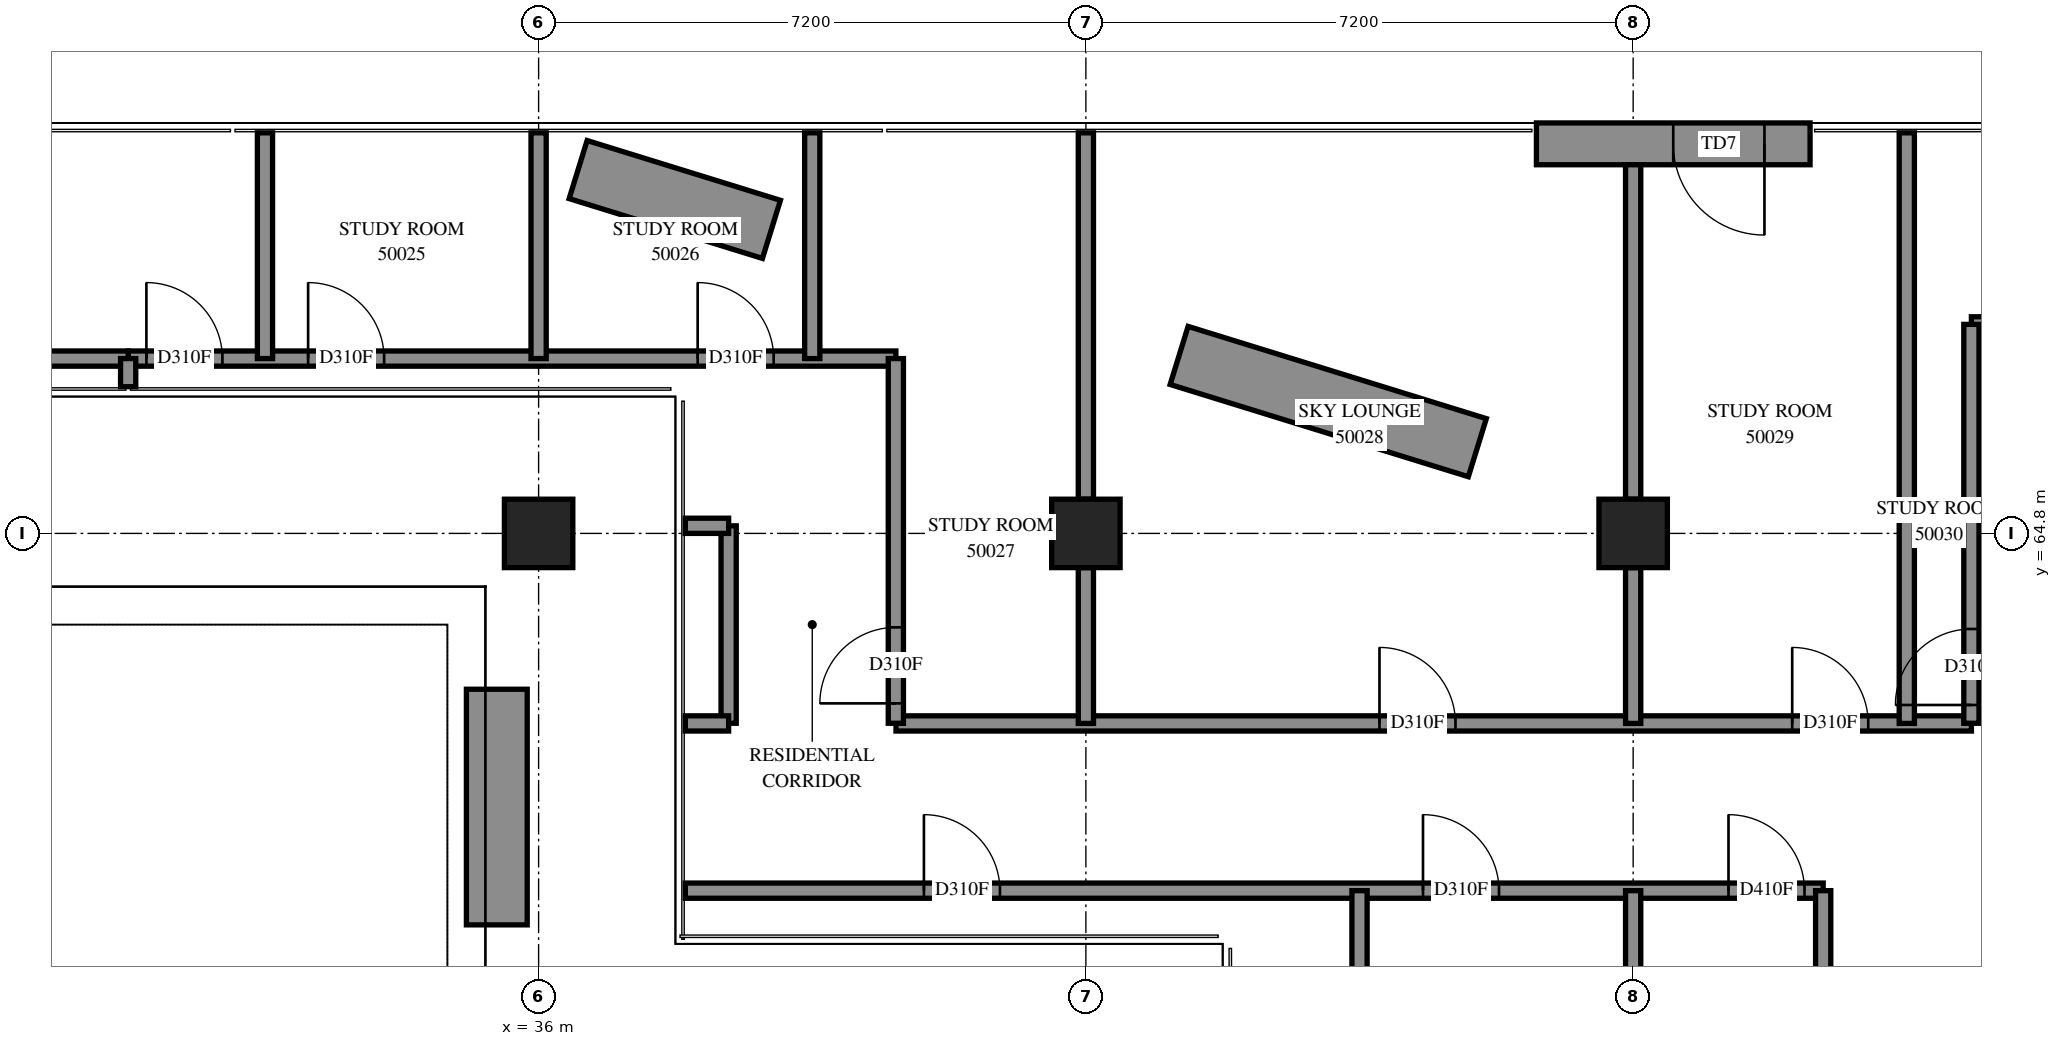
"""IFC4 building model, lengths in metres.
Left out: names, types, materials, properties, quantities, classifications, styles, units other than length and angle.
Written with IfcOpenShell. Run it as: python <this file> out.ifc"""

import sys

from ifc_helpers import new_model, si_unit, direction, frame, frame_2d, origin, origin_2d, place, context, subcontext, project, spatial, polyline, rectangle, outline, extrude, element, fill, save


model = new_model("IFC4")
c1 = context("Model", 3, precision=1e-05, world=origin(), true_north=direction((0.0, 1.0)))
c2 = subcontext(c1, "Body", "Model", "MODEL_VIEW")
j1 = project(units=[si_unit("LENGTHUNIT", "METRE"), si_unit("PLANEANGLEUNIT", "RADIAN")], contexts=[c1])
p1 = place(None, origin())
s1 = spatial("IfcSite", under=j1, at=p1, CompositionType="ELEMENT")
p2 = place(p1, origin())
s2 = spatial("IfcBuilding", under=s1, at=p2, CompositionType="ELEMENT")
p3 = place(p2, frame((0.0, 0.0, 185.4)))
s3 = spatial("IfcBuildingStorey", under=s2, at=p3, CompositionType="ELEMENT", Elevation=185.4)
for number, where, z_axis, x_axis in (
    (1, (36.0, 64.8, 0.0), (0.0, 0.0, 1.0), (1.0, 0.0, 0.0)),
    (2, (43.2, 64.8, 0.0), (0.0, 0.0, 1.0), (1.0, 0.0, 0.0)),
    (3, (50.4, 64.8, 0.0), (0.0, 0.0, 1.0), (1.0, 0.0, 0.0)),
):
    element("IfcColumn", number, at=place(p3, frame(where, z_axis=z_axis, x_axis=x_axis)), inside=s3, PredefinedType="COLUMN", context=c2, shape_type="SweptSolid", body=[
        extrude(rectangle(XDim=0.9, YDim=0.9, at=origin_2d()), origin(), (0.0, 0.0, 1.0), 3.9),
    ])
p4 = place(p3, frame((52.727, 69.925, 0.0), z_axis=(0.0, 0.0, 1.0), x_axis=(-1.0, 0.0, 0.0)))
e4 = element("IfcWall", 4, at=p4, inside=s3, PredefinedType="SOLIDWALL", context=c2, shape_type="SweptSolid", body=[
    extrude(rectangle(XDim=3.6, YDim=0.55, at=frame_2d((1.8, 0.0))), origin(), (0.0, 0.0, 1.0), 3.9),
])
p5 = place(p4, frame((0.6, 0.0, 0.0)))
e5 = element("IfcOpeningElement", 5, at=p5, cuts=e4, PredefinedType="OPENING", context=c2, shape_type="SweptSolid", body=[
    extrude(rectangle(XDim=1.2, YDim=2.4, at=frame_2d((0.6, 1.2))), frame((0.0, 0.285, 0.0), z_axis=(0.0, -1.0, 0.0), x_axis=(1.0, 0.0, 0.0)), (0.0, 0.0, 1.0), 0.57),
])
p6 = place(p3, frame((35.45, 62.75, 0.0), z_axis=(0.0, 0.0, 1.0), x_axis=(0.0, -1.0, 0.0)))
e6 = element("IfcWall", 6, at=p6, inside=s3, PredefinedType="SOLIDWALL", context=c2, shape_type="SweptSolid", body=[
    extrude(rectangle(XDim=3.1, YDim=0.8, at=frame_2d((1.55, 0.0))), origin(), (0.0, 0.0, 1.0), 0.65),
])
p7 = place(p3, frame((39.063, 68.8, 0.0), z_axis=(0.0, 0.0, 1.0), x_axis=(-0.9553548371, 0.2954608861, 0.0)))
e7 = element("IfcWall", 7, at=p7, inside=s3, PredefinedType="SOLIDWALL", context=c2, shape_type="SweptSolid", body=[
    extrude(rectangle(XDim=2.662, YDim=0.8, at=frame_2d((1.331, 0.0))), origin(), (0.0, 0.0, 1.0), 0.65),
])
p8 = place(p3, frame((54.85, 67.55, 0.0), z_axis=(0.0, 0.0, 1.0), x_axis=(1.0, 0.0, 0.0)))
e8 = element("IfcWall", 8, at=p8, inside=s3, PredefinedType="PARTITIONING", context=c2, shape_type="SweptSolid", body=[
    extrude(rectangle(XDim=19.9, YDim=0.2, at=frame_2d((9.95, 0.0))), origin(), (0.0, 0.0, 1.0), 3.9),
])
p9 = place(p8, frame((4.843, 0.0, 0.0)))
e9 = element("IfcOpeningElement", 9, at=p9, cuts=e8, PredefinedType="OPENING", context=c2, shape_type="SweptSolid", body=[
    extrude(rectangle(XDim=1.0, YDim=2.1, at=frame_2d((0.5, 1.05))), frame((0.0, 0.11, 0.0), z_axis=(0.0, -1.0, 0.0), x_axis=(1.0, 0.0, 0.0)), (0.0, 0.0, 1.0), 0.22),
])
p10 = place(p8, frame((6.918, 0.0, 0.0)))
e10 = element("IfcOpeningElement", 10, at=p10, cuts=e8, PredefinedType="OPENING", context=c2, shape_type="SweptSolid", body=[
    extrude(rectangle(XDim=1.0, YDim=2.1, at=frame_2d((0.5, 1.05))), frame((0.0, 0.11, 0.0), z_axis=(0.0, -1.0, 0.0), x_axis=(1.0, 0.0, 0.0)), (0.0, 0.0, 1.0), 0.22),
])
p11 = place(p8, frame((12.043, 0.0, 0.0)))
e11 = element("IfcOpeningElement", 11, at=p11, cuts=e8, PredefinedType="OPENING", context=c2, shape_type="SweptSolid", body=[
    extrude(rectangle(XDim=1.0, YDim=2.1, at=frame_2d((0.5, 1.05))), frame((0.0, 0.11, 0.0), z_axis=(0.0, -1.0, 0.0), x_axis=(1.0, 0.0, 0.0)), (0.0, 0.0, 1.0), 0.22),
])
p12 = place(p8, frame((14.117, 0.0, 0.0)))
e12 = element("IfcOpeningElement", 12, at=p12, cuts=e8, PredefinedType="OPENING", context=c2, shape_type="SweptSolid", body=[
    extrude(rectangle(XDim=1.0, YDim=2.1, at=frame_2d((0.5, 1.05))), frame((0.0, 0.11, 0.0), z_axis=(0.0, -1.0, 0.0), x_axis=(1.0, 0.0, 0.0)), (0.0, 0.0, 1.0), 0.22),
])
p13 = place(p3, frame((37.93, 60.1, 0.0), z_axis=(0.0, 0.0, 1.0), x_axis=(1.0, 0.0, 0.0)))
e13 = element("IfcWall", 13, at=p13, inside=s3, PredefinedType="PARTITIONING", context=c2, shape_type="SweptSolid", body=[
    extrude(rectangle(XDim=14.97, YDim=0.2, at=frame_2d((7.485, 0.0))), origin(), (0.0, 0.0, 1.0), 3.9),
])
p14 = place(p13, frame((3.139, 0.0, 0.0)))
e14 = element("IfcOpeningElement", 14, at=p14, cuts=e13, PredefinedType="OPENING", context=c2, shape_type="SweptSolid", body=[
    extrude(rectangle(XDim=1.0, YDim=2.1, at=frame_2d((0.5, 1.05))), frame((0.0, 0.11, 0.0), z_axis=(0.0, -1.0, 0.0), x_axis=(1.0, 0.0, 0.0)), (0.0, 0.0, 1.0), 0.22),
])
p15 = place(p13, frame((9.705, 0.0, 0.0)))
e15 = element("IfcOpeningElement", 15, at=p15, cuts=e13, PredefinedType="OPENING", context=c2, shape_type="SweptSolid", body=[
    extrude(rectangle(XDim=1.0, YDim=2.1, at=frame_2d((0.5, 1.05))), frame((0.0, 0.11, 0.0), z_axis=(0.0, -1.0, 0.0), x_axis=(1.0, 0.0, 0.0)), (0.0, 0.0, 1.0), 0.22),
])
p16 = place(p13, frame((13.724, 0.0, 0.0)))
e16 = element("IfcOpeningElement", 16, at=p16, cuts=e13, PredefinedType="OPENING", context=c2, shape_type="SweptSolid", body=[
    extrude(rectangle(XDim=1.0, YDim=2.1, at=frame_2d((0.5, 1.05))), frame((0.0, 0.11, 0.0), z_axis=(0.0, -1.0, 0.0), x_axis=(1.0, 0.0, 0.0)), (0.0, 0.0, 1.0), 0.22),
])
p17 = place(p3, frame((40.702, 62.3, 0.0), z_axis=(0.0, 0.0, 1.0), x_axis=(1.0, 0.0, 0.0)))
e17 = element("IfcWall", 17, at=p17, inside=s3, PredefinedType="PARTITIONING", context=c2, shape_type="SweptSolid", body=[
    extrude(rectangle(XDim=14.148, YDim=0.2, at=frame_2d((7.074, 0.0))), origin(), (0.0, 0.0, 1.0), 3.9),
])
p18 = place(p17, frame((6.361, 0.0, 0.0)))
e18 = element("IfcOpeningElement", 18, at=p18, cuts=e17, PredefinedType="OPENING", context=c2, shape_type="SweptSolid", body=[
    extrude(rectangle(XDim=1.0, YDim=2.1, at=frame_2d((0.5, 1.05))), frame((0.0, 0.11, 0.0), z_axis=(0.0, -1.0, 0.0), x_axis=(1.0, 0.0, 0.0)), (0.0, 0.0, 1.0), 0.22),
])
p19 = place(p17, frame((11.79, 0.0, 0.0)))
e19 = element("IfcOpeningElement", 19, at=p19, cuts=e17, PredefinedType="OPENING", context=c2, shape_type="SweptSolid", body=[
    extrude(rectangle(XDim=1.0, YDim=2.1, at=frame_2d((0.5, 1.05))), frame((0.0, 0.11, 0.0), z_axis=(0.0, -1.0, 0.0), x_axis=(1.0, 0.0, 0.0)), (0.0, 0.0, 1.0), 0.22),
])
p20 = place(p3, frame((30.6, 67.1, 0.0), z_axis=(0.0, 0.0, 1.0), x_axis=(1.0, 0.0, 0.0)))
e20 = element("IfcWall", 20, at=p20, inside=s3, PredefinedType="PARTITIONING", context=c2, shape_type="SweptSolid", body=[
    extrude(rectangle(XDim=10.1, YDim=0.2, at=frame_2d((5.05, 0.0))), origin(), (0.0, 0.0, 1.0), 3.9),
])
p21 = place(p20, frame((0.24, 0.0, 0.0)))
e21 = element("IfcOpeningElement", 21, at=p21, cuts=e20, PredefinedType="OPENING", context=c2, shape_type="SweptSolid", body=[
    extrude(rectangle(XDim=1.0, YDim=2.1, at=frame_2d((0.5, 1.05))), frame((0.0, 0.11, 0.0), z_axis=(0.0, -1.0, 0.0), x_axis=(1.0, 0.0, 0.0)), (0.0, 0.0, 1.0), 0.22),
])
p22 = place(p20, frame((2.368, 0.0, 0.0)))
e22 = element("IfcOpeningElement", 22, at=p22, cuts=e20, PredefinedType="OPENING", context=c2, shape_type="SweptSolid", body=[
    extrude(rectangle(XDim=1.0, YDim=2.1, at=frame_2d((0.5, 1.05))), frame((0.0, 0.11, 0.0), z_axis=(0.0, -1.0, 0.0), x_axis=(1.0, 0.0, 0.0)), (0.0, 0.0, 1.0), 0.22),
])
p23 = place(p20, frame((7.492, 0.0, 0.0)))
e23 = element("IfcOpeningElement", 23, at=p23, cuts=e20, PredefinedType="OPENING", context=c2, shape_type="SweptSolid", body=[
    extrude(rectangle(XDim=1.0, YDim=2.1, at=frame_2d((0.5, 1.05))), frame((0.0, 0.11, 0.0), z_axis=(0.0, -1.0, 0.0), x_axis=(1.0, 0.0, 0.0)), (0.0, 0.0, 1.0), 0.22),
])
for number, where, z_axis, x_axis in (
    (24, (46.8, 52.33, 0.0), (0.0, 0.0, 1.0), (0.0, 1.0, 0.0)),
    (25, (54.0, 62.3, 0.0), (0.0, 0.0, 1.0), (0.0, 1.0, 0.0)),
):
    element("IfcWall", number, at=place(p3, frame(where, z_axis=z_axis, x_axis=x_axis)), inside=s3, PredefinedType="PARTITIONING", context=c2, shape_type="SweptSolid", body=[
        extrude(rectangle(XDim=7.77, YDim=0.2, at=frame_2d((3.885, 0.0))), origin(), (0.0, 0.0, 1.0), 3.9),
    ])
p24 = place(p3, frame((23.53, 67.1, 0.0), z_axis=(0.0, 0.0, 1.0), x_axis=(1.0, 0.0, 0.0)))
e26 = element("IfcWall", 26, at=p24, inside=s3, PredefinedType="PARTITIONING", context=c2, shape_type="SweptSolid", body=[
    extrude(rectangle(XDim=7.07, YDim=0.2, at=frame_2d((3.535, 0.0))), origin(), (0.0, 0.0, 1.0), 3.9),
])
p25 = place(p3, frame((54.85, 62.302, 0.0), z_axis=(0.0, 0.0, 1.0), x_axis=(0.0, 1.0, 0.0)))
e27 = element("IfcWall", 27, at=p25, inside=s3, PredefinedType="PARTITIONING", context=c2, shape_type="SweptSolid", body=[
    extrude(rectangle(XDim=5.248, YDim=0.2, at=frame_2d((2.624, 0.0))), origin(), (0.0, 0.0, 1.0), 3.9),
])
p26 = place(p25, frame((0.241, 0.0, 0.0)))
e28 = element("IfcOpeningElement", 28, at=p26, cuts=e27, PredefinedType="OPENING", context=c2, shape_type="SweptSolid", body=[
    extrude(rectangle(XDim=1.0, YDim=2.1, at=frame_2d((0.5, 1.05))), frame((0.0, 0.11, 0.0), z_axis=(0.0, -1.0, 0.0), x_axis=(1.0, 0.0, 0.0)), (0.0, 0.0, 1.0), 0.22),
])
p27 = place(p3, frame((52.9, 55.102, 0.0), z_axis=(0.0, 0.0, 1.0), x_axis=(0.0, 1.0, 0.0)))
e29 = element("IfcWall", 29, at=p27, inside=s3, PredefinedType="PARTITIONING", context=c2, shape_type="SweptSolid", body=[
    extrude(rectangle(XDim=4.998, YDim=0.2, at=frame_2d((2.499, 0.0))), origin(), (0.0, 0.0, 1.0), 3.9),
])
p28 = place(p3, frame((43.2, 65.25, 0.0), z_axis=(0.0, 0.0, 1.0), x_axis=(0.0, 1.0, 0.0)))
e30 = element("IfcWall", 30, at=p28, inside=s3, PredefinedType="PARTITIONING", context=c2, shape_type="SweptSolid", body=[
    extrude(rectangle(XDim=4.82, YDim=0.2, at=frame_2d((2.41, 0.0))), origin(), (0.0, 0.0, 1.0), 3.9),
])
p29 = place(p3, frame((50.4, 65.25, 0.0), z_axis=(0.0, 0.0, 1.0), x_axis=(0.0, 1.0, 0.0)))
e31 = element("IfcWall", 31, at=p29, inside=s3, PredefinedType="PARTITIONING", context=c2, shape_type="SweptSolid", body=[
    extrude(rectangle(XDim=4.4, YDim=0.2, at=frame_2d((2.2, 0.0))), origin(), (0.0, 0.0, 1.0), 3.9),
])
p30 = place(p3, frame((40.7, 62.302, 0.0), z_axis=(0.0, 0.0, 1.0), x_axis=(0.0, 1.0, 0.0)))
e32 = element("IfcWall", 32, at=p30, inside=s3, PredefinedType="PARTITIONING", context=c2, shape_type="SweptSolid", body=[
    extrude(rectangle(XDim=4.798, YDim=0.2, at=frame_2d((2.399, 0.0))), origin(), (0.0, 0.0, 1.0), 3.9),
])
p31 = place(p30, frame((0.262, 0.0, 0.0)))
e33 = element("IfcOpeningElement", 33, at=p31, cuts=e32, PredefinedType="OPENING", context=c2, shape_type="SweptSolid", body=[
    extrude(rectangle(XDim=1.0, YDim=2.1, at=frame_2d((0.5, 1.05))), frame((0.0, 0.11, 0.0), z_axis=(0.0, -1.0, 0.0), x_axis=(1.0, 0.0, 0.0)), (0.0, 0.0, 1.0), 0.22),
])
for number, where, z_axis, x_axis in (
    (34, (32.4, 67.1, 0.0), (0.0, 0.0, 1.0), (0.0, 1.0, 0.0)),
    (35, (36.0, 67.1, 0.0), (0.0, 0.0, 1.0), (0.0, 1.0, 0.0)),
    (36, (39.6, 67.1, 0.0), (0.0, 0.0, 1.0), (0.0, 1.0, 0.0)),
):
    element("IfcWall", number, at=place(p3, frame(where, z_axis=z_axis, x_axis=x_axis)), inside=s3, PredefinedType="PARTITIONING", context=c2, shape_type="SweptSolid", body=[
        extrude(rectangle(XDim=2.97, YDim=0.2, at=frame_2d((1.485, 0.0))), origin(), (0.0, 0.0, 1.0), 3.9),
    ])
p32 = place(p3, frame((38.5, 62.302, 0.0), z_axis=(0.0, 0.0, 1.0), x_axis=(0.0, 1.0, 0.0)))
e37 = element("IfcWall", 37, at=p32, inside=s3, PredefinedType="PARTITIONING", context=c2, shape_type="SweptSolid", body=[
    extrude(rectangle(XDim=2.598, YDim=0.2, at=frame_2d((1.299, 0.0))), origin(), (0.0, 0.0, 1.0), 3.9),
])
for number, where, z_axis, x_axis in (
    (38, (43.2, 62.3, 0.0), (0.0, 0.0, 1.0), (0.0, 1.0, 0.0)),
    (39, (50.4, 62.3, 0.0), (0.0, 0.0, 1.0), (0.0, 1.0, 0.0)),
):
    element("IfcWall", number, at=place(p3, frame(where, z_axis=z_axis, x_axis=x_axis)), inside=s3, PredefinedType="PARTITIONING", context=c2, shape_type="SweptSolid", body=[
        extrude(rectangle(XDim=2.05, YDim=0.2, at=frame_2d((1.025, 0.0))), origin(), (0.0, 0.0, 1.0), 3.9),
    ])
p33 = place(p3, frame((50.4, 58.156, 0.0), z_axis=(0.0, 0.0, 1.0), x_axis=(0.0, 1.0, 0.0)))
e40 = element("IfcWall", 40, at=p33, inside=s3, PredefinedType="PARTITIONING", context=c2, shape_type="SweptSolid", body=[
    extrude(rectangle(XDim=1.944, YDim=0.2, at=frame_2d((0.972, 0.0))), origin(), (0.0, 0.0, 1.0), 3.9),
])
for number, where, z_axis, x_axis in (
    (41, (37.93, 62.3, 0.0), (0.0, 0.0, 1.0), (1.0, 0.0, 0.0)),
    (42, (37.93, 64.9, 0.0), (0.0, 0.0, 1.0), (1.0, 0.0, 0.0)),
):
    element("IfcWall", number, at=place(p3, frame(where, z_axis=z_axis, x_axis=x_axis)), inside=s3, PredefinedType="PARTITIONING", context=c2, shape_type="SweptSolid", body=[
        extrude(rectangle(XDim=0.57, YDim=0.2, at=frame_2d((0.285, 0.0))), origin(), (0.0, 0.0, 1.0), 3.9),
    ])
p34 = place(p3, frame((30.6, 66.73, 0.0), z_axis=(0.0, 0.0, 1.0), x_axis=(0.0, 1.0, 0.0)))
e43 = element("IfcWall", 43, at=p34, inside=s3, PredefinedType="PARTITIONING", context=c2, shape_type="SweptSolid", body=[
    extrude(rectangle(XDim=0.37, YDim=0.2, at=frame_2d((0.185, 0.0))), origin(), (0.0, 0.0, 1.0), 3.9),
])
p35 = place(p3, frame((48.35, 65.928, 0.0), z_axis=(0.0, 0.0, 1.0), x_axis=(-0.9553584107, 0.2954493308, 0.0)))
e44 = element("IfcWall", 44, at=p35, inside=s3, PredefinedType="SOLIDWALL", context=c2, shape_type="SweptSolid", body=[
    extrude(outline(polyline([(0.0, -0.4), (4.107, -0.4), (4.107, 0.4), (0.0, 0.4), (0.0, -0.4)])), origin(), (0.0, 0.0, 1.0), 0.65),
])
p36 = place(p5, origin())
e45 = element("IfcDoor", 45, at=p36, inside=s3, OperationType="SINGLE_SWING_LEFT", PredefinedType="DOOR", context=c2, shape_type="SweptSolid", body=[
    extrude(rectangle(XDim=1.2, YDim=2.4, at=frame_2d((0.6, 1.2))), frame((0.0, 0.025, 0.0), z_axis=(0.0, -1.0, 0.0), x_axis=(1.0, 0.0, 0.0)), (0.0, 0.0, 1.0), 0.05),
])
fill(e5, e45)
p37 = place(p14, origin())
e46 = element("IfcDoor", 46, at=p37, inside=s3, OperationType="SINGLE_SWING_RIGHT", PredefinedType="DOOR", context=c2, shape_type="SweptSolid", body=[
    extrude(rectangle(XDim=1.0, YDim=2.1, at=frame_2d((0.5, 1.05))), frame((0.0, 0.025, 0.0), z_axis=(0.0, -1.0, 0.0), x_axis=(1.0, 0.0, 0.0)), (0.0, 0.0, 1.0), 0.05),
])
fill(e14, e46)
p38 = place(p15, origin())
e47 = element("IfcDoor", 47, at=p38, inside=s3, OperationType="SINGLE_SWING_RIGHT", PredefinedType="DOOR", context=c2, shape_type="SweptSolid", body=[
    extrude(rectangle(XDim=1.0, YDim=2.1, at=frame_2d((0.5, 1.05))), frame((0.0, 0.025, 0.0), z_axis=(0.0, -1.0, 0.0), x_axis=(1.0, 0.0, 0.0)), (0.0, 0.0, 1.0), 0.05),
])
fill(e15, e47)
p39 = place(p16, origin())
e48 = element("IfcDoor", 48, at=p39, inside=s3, OperationType="SINGLE_SWING_LEFT", PredefinedType="DOOR", context=c2, shape_type="SweptSolid", body=[
    extrude(rectangle(XDim=1.0, YDim=2.1, at=frame_2d((0.5, 1.05))), frame((0.0, 0.025, 0.0), z_axis=(0.0, -1.0, 0.0), x_axis=(1.0, 0.0, 0.0)), (0.0, 0.0, 1.0), 0.05),
])
fill(e16, e48)
p40 = place(p21, origin())
e49 = element("IfcDoor", 49, at=p40, inside=s3, OperationType="SINGLE_SWING_LEFT", PredefinedType="DOOR", context=c2, shape_type="SweptSolid", body=[
    extrude(rectangle(XDim=1.0, YDim=2.1, at=frame_2d((0.5, 1.05))), frame((0.0, 0.025, 0.0), z_axis=(0.0, -1.0, 0.0), x_axis=(1.0, 0.0, 0.0)), (0.0, 0.0, 1.0), 0.05),
])
fill(e21, e49)
p41 = place(p22, origin())
e50 = element("IfcDoor", 50, at=p41, inside=s3, OperationType="SINGLE_SWING_LEFT", PredefinedType="DOOR", context=c2, shape_type="SweptSolid", body=[
    extrude(rectangle(XDim=1.0, YDim=2.1, at=frame_2d((0.5, 1.05))), frame((0.0, 0.025, 0.0), z_axis=(0.0, -1.0, 0.0), x_axis=(1.0, 0.0, 0.0)), (0.0, 0.0, 1.0), 0.05),
])
fill(e22, e50)
p42 = place(p23, origin())
e51 = element("IfcDoor", 51, at=p42, inside=s3, OperationType="SINGLE_SWING_RIGHT", PredefinedType="DOOR", context=c2, shape_type="SweptSolid", body=[
    extrude(rectangle(XDim=1.0, YDim=2.1, at=frame_2d((0.5, 1.05))), frame((0.0, 0.025, 0.0), z_axis=(0.0, -1.0, 0.0), x_axis=(1.0, 0.0, 0.0)), (0.0, 0.0, 1.0), 0.05),
])
fill(e23, e51)
p43 = place(p31, origin())
e52 = element("IfcDoor", 52, at=p43, inside=s3, OperationType="SINGLE_SWING_LEFT", PredefinedType="DOOR", context=c2, shape_type="SweptSolid", body=[
    extrude(rectangle(XDim=1.0, YDim=2.1, at=frame_2d((0.5, 1.05))), frame((0.0, 0.025, 0.0), z_axis=(0.0, -1.0, 0.0), x_axis=(1.0, 0.0, 0.0)), (0.0, 0.0, 1.0), 0.05),
])
fill(e33, e52)
p44 = place(p18, origin())
e53 = element("IfcDoor", 53, at=p44, inside=s3, OperationType="SINGLE_SWING_RIGHT", PredefinedType="DOOR", context=c2, shape_type="SweptSolid", body=[
    extrude(rectangle(XDim=1.0, YDim=2.1, at=frame_2d((0.5, 1.05))), frame((0.0, 0.025, 0.0), z_axis=(0.0, -1.0, 0.0), x_axis=(1.0, 0.0, 0.0)), (0.0, 0.0, 1.0), 0.05),
])
fill(e18, e53)
p45 = place(p19, origin())
e54 = element("IfcDoor", 54, at=p45, inside=s3, OperationType="SINGLE_SWING_RIGHT", PredefinedType="DOOR", context=c2, shape_type="SweptSolid", body=[
    extrude(rectangle(XDim=1.0, YDim=2.1, at=frame_2d((0.5, 1.05))), frame((0.0, 0.025, 0.0), z_axis=(0.0, -1.0, 0.0), x_axis=(1.0, 0.0, 0.0)), (0.0, 0.0, 1.0), 0.05),
])
fill(e19, e54)
p46 = place(p26, origin())
e55 = element("IfcDoor", 55, at=p46, inside=s3, OperationType="SINGLE_SWING_LEFT", PredefinedType="DOOR", context=c2, shape_type="SweptSolid", body=[
    extrude(rectangle(XDim=1.0, YDim=2.1, at=frame_2d((0.5, 1.05))), frame((0.0, 0.025, 0.0), z_axis=(0.0, -1.0, 0.0), x_axis=(1.0, 0.0, 0.0)), (0.0, 0.0, 1.0), 0.05),
])
fill(e28, e55)
save(model, sys.argv[1])
